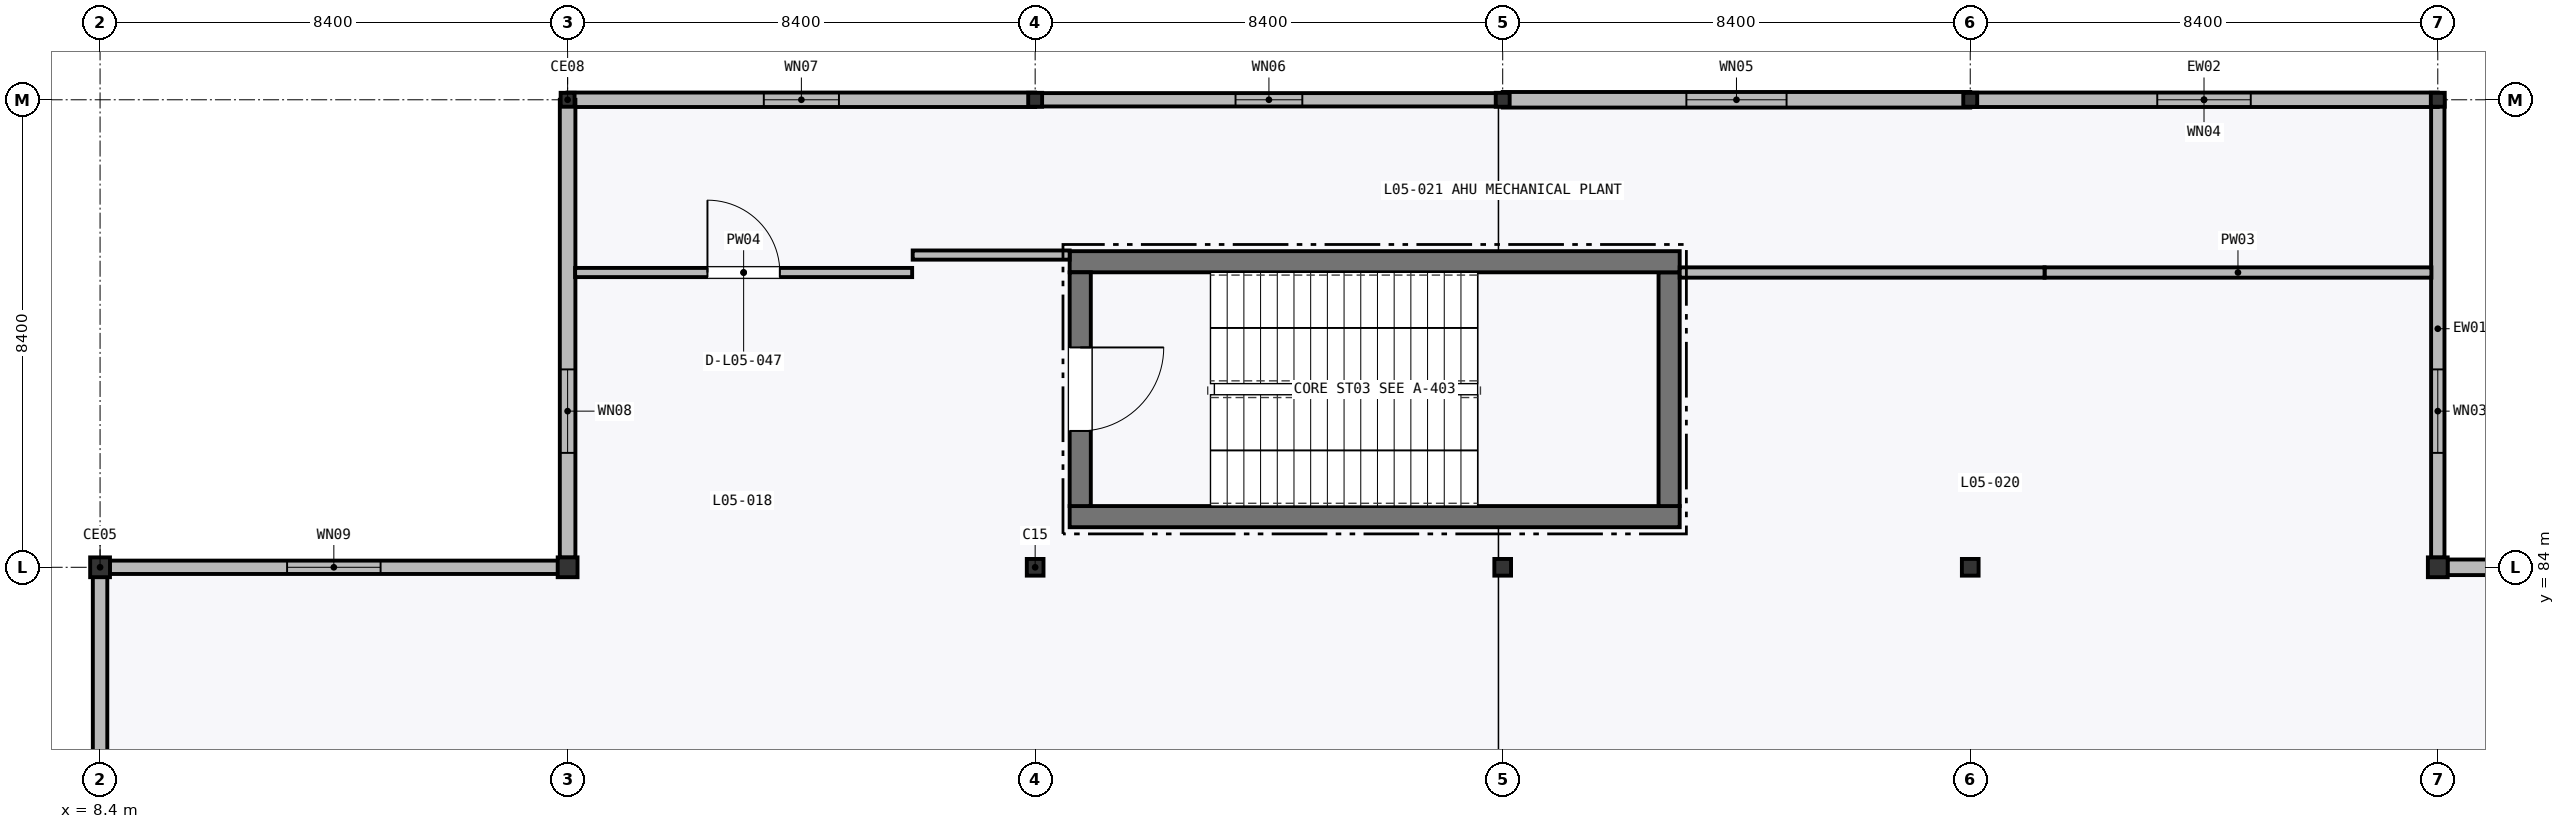
"""IFC4 building model, lengths in metres.
Left out: names, types, materials, properties, quantities, classifications, styles, units other than length and angle.
Written with IfcOpenShell. Run it as: python <this file> out.ifc"""

import sys

from ifc_helpers import new_model, si_unit, direction, frame, frame_2d, origin, origin_2d, place, context, subcontext, project, spatial, rectangle, hollow_circle, i_section, extrude, element, fill, save


model = new_model("IFC4")
c1 = context("Model", 3, precision=1e-05, world=origin(), true_north=direction((0.0, 1.0)))
c2 = subcontext(c1, "Body", "Model", "MODEL_VIEW")
j1 = project(units=[si_unit("LENGTHUNIT", "METRE"), si_unit("PLANEANGLEUNIT", "RADIAN")], contexts=[c1])
p1 = place(None, origin())
s1 = spatial("IfcSite", under=j1, at=p1, CompositionType="ELEMENT")
p2 = place(p1, origin())
s2 = spatial("IfcBuilding", under=s1, at=p2, CompositionType="ELEMENT")
p3 = place(p2, frame((0.0, 0.0, 21.6)))
s3 = spatial("IfcBuildingStorey", under=s2, at=p3, CompositionType="ELEMENT", Elevation=21.6)
for number, where, z_axis, x_axis in (
    (1, (8.4, 84.0, 0.0), (0.0, 0.0, 1.0), (1.0, 0.0, 0.0)),
    (2, (16.8, 84.0, 0.0), (0.0, 0.0, 1.0), (1.0, 0.0, 0.0)),
):
    element("IfcColumn", number, at=place(p3, frame(where, z_axis=z_axis, x_axis=x_axis)), inside=s3, PredefinedType="COLUMN", context=c2, shape_type="SweptSolid", body=[
        extrude(hollow_circle(Radius=0.178, WallThickness=0.014, at=origin_2d()), origin(), (0.0, 0.0, 1.0), 5.1),
    ])
p4 = place(p3, frame((16.8, 92.4, 0.0), z_axis=(0.0, 0.0, 1.0), x_axis=(1.0, 0.0, 0.0)))
e3 = element("IfcColumn", 3, at=p4, inside=s3, PredefinedType="COLUMN", context=c2, shape_type="SweptSolid", body=[
    extrude(i_section(OverallWidth=0.25, OverallDepth=0.25, WebThickness=0.009, FlangeThickness=0.014, FilletRadius=0.016, at=origin_2d()), origin(), (0.0, 0.0, 1.0), 5.1),
])
p5 = place(p3, frame((25.2, 84.0, 0.0), z_axis=(0.0, 0.0, 1.0), x_axis=(1.0, 0.0, 0.0)))
e4 = element("IfcColumn", 4, at=p5, inside=s3, PredefinedType="COLUMN", context=c2, shape_type="SweptSolid", body=[
    extrude(i_section(OverallWidth=0.3, OverallDepth=0.3, WebThickness=0.01, FlangeThickness=0.015, FilletRadius=0.018, at=origin_2d()), origin(), (0.0, 0.0, 1.0), 5.1),
])
p6 = place(p3, frame((25.2, 92.4, 0.0), z_axis=(0.0, 0.0, 1.0), x_axis=(1.0, 0.0, 0.0)))
e5 = element("IfcColumn", 5, at=p6, inside=s3, PredefinedType="COLUMN", context=c2, shape_type="SweptSolid", body=[
    extrude(i_section(OverallWidth=0.25, OverallDepth=0.25, WebThickness=0.009, FlangeThickness=0.014, FilletRadius=0.016, at=origin_2d()), origin(), (0.0, 0.0, 1.0), 5.1),
])
p7 = place(p3, frame((33.6, 84.0, 0.0), z_axis=(0.0, 0.0, 1.0), x_axis=(1.0, 0.0, 0.0)))
e6 = element("IfcColumn", 6, at=p7, inside=s3, PredefinedType="COLUMN", context=c2, shape_type="SweptSolid", body=[
    extrude(i_section(OverallWidth=0.3, OverallDepth=0.3, WebThickness=0.01, FlangeThickness=0.015, FilletRadius=0.018, at=origin_2d()), origin(), (0.0, 0.0, 1.0), 5.1),
])
p8 = place(p3, frame((33.6, 92.4, 0.0), z_axis=(0.0, 0.0, 1.0), x_axis=(1.0, 0.0, 0.0)))
e7 = element("IfcColumn", 7, at=p8, inside=s3, PredefinedType="COLUMN", context=c2, shape_type="SweptSolid", body=[
    extrude(i_section(OverallWidth=0.25, OverallDepth=0.25, WebThickness=0.009, FlangeThickness=0.014, FilletRadius=0.016, at=origin_2d()), origin(), (0.0, 0.0, 1.0), 5.1),
])
p9 = place(p3, frame((42.0, 84.0, 0.0), z_axis=(0.0, 0.0, 1.0), x_axis=(1.0, 0.0, 0.0)))
e8 = element("IfcColumn", 8, at=p9, inside=s3, PredefinedType="COLUMN", context=c2, shape_type="SweptSolid", body=[
    extrude(i_section(OverallWidth=0.3, OverallDepth=0.3, WebThickness=0.01, FlangeThickness=0.015, FilletRadius=0.018, at=origin_2d()), origin(), (0.0, 0.0, 1.0), 5.1),
])
p10 = place(p3, frame((42.0, 92.4, 0.0), z_axis=(0.0, 0.0, 1.0), x_axis=(1.0, 0.0, 0.0)))
e9 = element("IfcColumn", 9, at=p10, inside=s3, PredefinedType="COLUMN", context=c2, shape_type="SweptSolid", body=[
    extrude(i_section(OverallWidth=0.25, OverallDepth=0.25, WebThickness=0.009, FlangeThickness=0.014, FilletRadius=0.016, at=origin_2d()), origin(), (0.0, 0.0, 1.0), 5.1),
])
p11 = place(p3, frame((50.4, 84.0, 0.0), z_axis=(0.0, 0.0, 1.0), x_axis=(1.0, 0.0, 0.0)))
e10 = element("IfcColumn", 10, at=p11, inside=s3, PredefinedType="COLUMN", context=c2, shape_type="SweptSolid", body=[
    extrude(hollow_circle(Radius=0.178, WallThickness=0.014, at=origin_2d()), origin(), (0.0, 0.0, 1.0), 5.1),
])
p12 = place(p3, frame((50.4, 92.4, 0.0), z_axis=(0.0, 0.0, 1.0), x_axis=(1.0, 0.0, 0.0)))
e11 = element("IfcColumn", 11, at=p12, inside=s3, PredefinedType="COLUMN", context=c2, shape_type="SweptSolid", body=[
    extrude(i_section(OverallWidth=0.25, OverallDepth=0.25, WebThickness=0.009, FlangeThickness=0.014, FilletRadius=0.016, at=origin_2d()), origin(), (0.0, 0.0, 1.0), 5.1),
])
p13 = place(p3, frame((58.65, 84.0, 0.0), z_axis=(0.0, 0.0, 1.0), x_axis=(-1.0, 0.0, 0.0)))
e12 = element("IfcWall", 12, at=p13, inside=s3, PredefinedType="STANDARD", context=c2, shape_type="SweptSolid", body=[
    extrude(rectangle(XDim=8.077, YDim=0.28, at=frame_2d((4.039, 0.0))), origin(), (0.0, 0.0, 1.0), 4.487),
])
p14 = place(p13, frame((3.364, 0.0, 0.95)))
e13 = element("IfcOpeningElement", 13, at=p14, cuts=e12, PredefinedType="OPENING", context=c2, shape_type="SweptSolid", body=[
    extrude(rectangle(XDim=1.35, YDim=1.8, at=frame_2d((0.675, 0.9))), frame((0.0, 0.15, 0.0), z_axis=(0.0, -1.0, 0.0), x_axis=(1.0, 0.0, 0.0)), (0.0, 0.0, 1.0), 0.3),
])
p15 = place(p3, frame((50.4, 84.173, 0.0), z_axis=(0.0, 0.0, 1.0), x_axis=(0.0, 1.0, 0.0)))
e14 = element("IfcWall", 14, at=p15, inside=s3, PredefinedType="STANDARD", context=c2, shape_type="SweptSolid", body=[
    extrude(rectangle(XDim=8.227, YDim=0.24, at=frame_2d((4.113, 0.0))), origin(), (0.0, 0.0, 1.0), 4.397),
])
p16 = place(p15, frame((1.883, 0.0, 0.95)))
e15 = element("IfcOpeningElement", 15, at=p16, cuts=e14, PredefinedType="OPENING", context=c2, shape_type="SweptSolid", body=[
    extrude(rectangle(XDim=1.5, YDim=1.8, at=frame_2d((0.75, 0.9))), frame((0.0, 0.13, 0.0), z_axis=(0.0, -1.0, 0.0), x_axis=(1.0, 0.0, 0.0)), (0.0, 0.0, 1.0), 0.26),
])
p17 = place(p3, frame((50.4, 92.4, 0.0), z_axis=(0.0, 0.0, 1.0), x_axis=(-1.0, 0.0, 0.0)))
e16 = element("IfcWall", 16, at=p17, inside=s3, PredefinedType="STANDARD", context=c2, shape_type="SweptSolid", body=[
    extrude(rectangle(XDim=8.4, YDim=0.26, at=frame_2d((4.2, 0.0))), origin(), (0.0, 0.0, 1.0), 4.397),
])
p18 = place(p17, frame((3.36, 0.0, 0.95)))
e17 = element("IfcOpeningElement", 17, at=p18, cuts=e16, PredefinedType="OPENING", context=c2, shape_type="SweptSolid", body=[
    extrude(rectangle(XDim=1.68, YDim=1.8, at=frame_2d((0.84, 0.9))), frame((0.0, 0.14, 0.0), z_axis=(0.0, -1.0, 0.0), x_axis=(1.0, 0.0, 0.0)), (0.0, 0.0, 1.0), 0.28),
])
p19 = place(p3, frame((42.0, 92.4, 0.0), z_axis=(0.0, 0.0, 1.0), x_axis=(-1.0, 0.0, 0.0)))
e18 = element("IfcWall", 18, at=p19, inside=s3, PredefinedType="STANDARD", context=c2, shape_type="SweptSolid", body=[
    extrude(rectangle(XDim=8.4, YDim=0.28, at=frame_2d((4.2, 0.0))), origin(), (0.0, 0.0, 1.0), 4.397),
])
p20 = place(p19, frame((3.3, 0.0, 0.95)))
e19 = element("IfcOpeningElement", 19, at=p20, cuts=e18, PredefinedType="OPENING", context=c2, shape_type="SweptSolid", body=[
    extrude(rectangle(XDim=1.8, YDim=1.8, at=frame_2d((0.9, 0.9))), frame((0.0, 0.15, 0.0), z_axis=(0.0, -1.0, 0.0), x_axis=(1.0, 0.0, 0.0)), (0.0, 0.0, 1.0), 0.3),
])
p21 = place(p3, frame((33.6, 92.4, 0.0), z_axis=(0.0, 0.0, 1.0), x_axis=(-1.0, 0.0, 0.0)))
e20 = element("IfcWall", 20, at=p21, inside=s3, PredefinedType="STANDARD", context=c2, shape_type="SweptSolid", body=[
    extrude(rectangle(XDim=8.4, YDim=0.24, at=frame_2d((4.2, 0.0))), origin(), (0.0, 0.0, 1.0), 4.397),
])
p22 = place(p21, frame((3.6, 0.0, 0.95)))
e21 = element("IfcOpeningElement", 21, at=p22, cuts=e20, PredefinedType="OPENING", context=c2, shape_type="SweptSolid", body=[
    extrude(rectangle(XDim=1.2, YDim=2.1, at=frame_2d((0.6, 1.05))), frame((0.0, 0.13, 0.0), z_axis=(0.0, -1.0, 0.0), x_axis=(1.0, 0.0, 0.0)), (0.0, 0.0, 1.0), 0.26),
])
p23 = place(p3, frame((25.2, 92.4, 0.0), z_axis=(0.0, 0.0, 1.0), x_axis=(-1.0, 0.0, 0.0)))
e22 = element("IfcWall", 22, at=p23, inside=s3, PredefinedType="STANDARD", context=c2, shape_type="SweptSolid", body=[
    extrude(rectangle(XDim=8.4, YDim=0.26, at=frame_2d((4.2, 0.0))), origin(), (0.0, 0.0, 1.0), 4.397),
])
p24 = place(p23, frame((3.525, 0.0, 0.95)))
e23 = element("IfcOpeningElement", 23, at=p24, cuts=e22, PredefinedType="OPENING", context=c2, shape_type="SweptSolid", body=[
    extrude(rectangle(XDim=1.35, YDim=2.1, at=frame_2d((0.675, 1.05))), frame((0.0, 0.14, 0.0), z_axis=(0.0, -1.0, 0.0), x_axis=(1.0, 0.0, 0.0)), (0.0, 0.0, 1.0), 0.28),
])
p25 = place(p3, frame((16.8, 92.4, 0.0), z_axis=(0.0, 0.0, 1.0), x_axis=(0.0, -1.0, 0.0)))
e24 = element("IfcWall", 24, at=p25, inside=s3, PredefinedType="STANDARD", context=c2, shape_type="SweptSolid", body=[
    extrude(rectangle(XDim=8.227, YDim=0.28, at=frame_2d((4.113, 0.0))), origin(), (0.0, 0.0, 1.0), 4.397),
])
p26 = place(p25, frame((4.844, 0.0, 0.95)))
e25 = element("IfcOpeningElement", 25, at=p26, cuts=e24, PredefinedType="OPENING", context=c2, shape_type="SweptSolid", body=[
    extrude(rectangle(XDim=1.5, YDim=2.1, at=frame_2d((0.75, 1.05))), frame((0.0, 0.15, 0.0), z_axis=(0.0, -1.0, 0.0), x_axis=(1.0, 0.0, 0.0)), (0.0, 0.0, 1.0), 0.3),
])
p27 = place(p3, frame((16.627, 84.0, 0.0), z_axis=(0.0, 0.0, 1.0), x_axis=(-1.0, 0.0, 0.0)))
e26 = element("IfcWall", 26, at=p27, inside=s3, PredefinedType="STANDARD", context=c2, shape_type="SweptSolid", body=[
    extrude(rectangle(XDim=8.054, YDim=0.24, at=frame_2d((4.027, 0.0))), origin(), (0.0, 0.0, 1.0), 4.487),
])
p28 = place(p27, frame((3.187, 0.0, 0.95)))
e27 = element("IfcOpeningElement", 27, at=p28, cuts=e26, PredefinedType="OPENING", context=c2, shape_type="SweptSolid", body=[
    extrude(rectangle(XDim=1.68, YDim=2.1, at=frame_2d((0.84, 1.05))), frame((0.0, 0.13, 0.0), z_axis=(0.0, -1.0, 0.0), x_axis=(1.0, 0.0, 0.0)), (0.0, 0.0, 1.0), 0.26),
])
p29 = place(p3, frame((8.4, 83.827, 0.0), z_axis=(0.0, 0.0, 1.0), x_axis=(0.0, -1.0, 0.0)))
e28 = element("IfcWall", 28, at=p29, inside=s3, PredefinedType="STANDARD", context=c2, shape_type="SweptSolid", body=[
    extrude(rectangle(XDim=8.227, YDim=0.26, at=frame_2d((4.113, 0.0))), origin(), (0.0, 0.0, 1.0), 4.397),
])
p30 = place(p29, frame((3.213, 0.0, 0.95)))
e29 = element("IfcOpeningElement", 29, at=p30, cuts=e28, PredefinedType="OPENING", context=c2, shape_type="SweptSolid", body=[
    extrude(rectangle(XDim=1.8, YDim=2.1, at=frame_2d((0.9, 1.05))), frame((0.0, 0.14, 0.0), z_axis=(0.0, -1.0, 0.0), x_axis=(1.0, 0.0, 0.0)), (0.0, 0.0, 1.0), 0.28),
])
p31 = place(p3, frame((25.82, 84.91, 0.0), z_axis=(0.0, 0.0, 1.0), x_axis=(1.0, 0.0, 0.0)))
e30 = element("IfcWall", 30, at=p31, inside=s3, PredefinedType="SHEAR", context=c2, shape_type="SweptSolid", body=[
    extrude(rectangle(XDim=10.96, YDim=0.38, at=frame_2d((5.48, 0.0))), origin(), (0.0, 0.0, 1.0), 4.845),
])
p32 = place(p3, frame((36.59, 85.1, 0.0), z_axis=(0.0, 0.0, 1.0), x_axis=(0.0, 1.0, 0.0)))
e31 = element("IfcWall", 31, at=p32, inside=s3, PredefinedType="SHEAR", context=c2, shape_type="SweptSolid", body=[
    extrude(rectangle(XDim=4.2, YDim=0.38, at=frame_2d((2.1, 0.0))), origin(), (0.0, 0.0, 1.0), 4.845),
])
p33 = place(p3, frame((36.78, 89.49, 0.0), z_axis=(0.0, 0.0, 1.0), x_axis=(-1.0, 0.0, 0.0)))
e32 = element("IfcWall", 32, at=p33, inside=s3, PredefinedType="SHEAR", context=c2, shape_type="SweptSolid", body=[
    extrude(rectangle(XDim=10.96, YDim=0.38, at=frame_2d((5.48, 0.0))), origin(), (0.0, 0.0, 1.0), 4.845),
])
p34 = place(p3, frame((26.01, 89.3, 0.0), z_axis=(0.0, 0.0, 1.0), x_axis=(0.0, -1.0, 0.0)))
e33 = element("IfcWall", 33, at=p34, inside=s3, PredefinedType="SHEAR", context=c2, shape_type="SweptSolid", body=[
    extrude(rectangle(XDim=4.2, YDim=0.38, at=frame_2d((2.1, 0.0))), origin(), (0.0, 0.0, 1.0), 4.845),
])
p35 = place(p34, frame((1.35, 0.0, 0.0)))
e34 = element("IfcOpeningElement", 34, at=p35, cuts=e33, PredefinedType="OPENING", context=c2, shape_type="SweptSolid", body=[
    extrude(rectangle(XDim=1.5, YDim=2.15, at=frame_2d((0.75, 1.075))), frame((0.0, 0.2, 0.0), z_axis=(0.0, -1.0, 0.0), x_axis=(1.0, 0.0, 0.0)), (0.0, 0.0, 1.0), 0.4),
])
p36 = place(p3, frame((50.285, 89.296, 0.0), z_axis=(0.0, 0.0, 1.0), x_axis=(-1.0, 0.0, 0.0)))
e35 = element("IfcWall", 35, at=p36, inside=s3, PredefinedType="PARTITIONING", context=c2, shape_type="SweptSolid", body=[
    extrude(rectangle(XDim=6.95, YDim=0.185, at=frame_2d((3.475, 0.0))), origin(), (0.0, 0.0, 1.0), 4.845),
])
p37 = place(p3, frame((43.335, 89.296, 0.0), z_axis=(0.0, 0.0, 1.0), x_axis=(-1.0, 0.0, 0.0)))
e36 = element("IfcWall", 36, at=p37, inside=s3, PredefinedType="PARTITIONING", context=c2, shape_type="SweptSolid", body=[
    extrude(rectangle(XDim=6.555, YDim=0.185, at=frame_2d((3.277, 0.0))), origin(), (0.0, 0.0, 1.0), 4.845),
])
p38 = place(p3, frame((16.935, 89.296, 0.0), z_axis=(0.0, 0.0, 1.0), x_axis=(1.0, 0.0, 0.0)))
e37 = element("IfcWall", 37, at=p38, inside=s3, PredefinedType="PARTITIONING", context=c2, shape_type="SweptSolid", body=[
    extrude(rectangle(XDim=6.055, YDim=0.165, at=frame_2d((3.027, 0.0))), origin(), (0.0, 0.0, 1.0), 4.845),
])
p39 = place(p38, frame((2.377, 0.0, 0.0)))
e38 = element("IfcOpeningElement", 38, at=p39, cuts=e37, PredefinedType="OPENING", context=c2, shape_type="SweptSolid", body=[
    extrude(rectangle(XDim=1.3, YDim=2.2, at=frame_2d((0.65, 1.1))), frame((0.0, 0.093, 0.0), z_axis=(0.0, -1.0, 0.0), x_axis=(1.0, 0.0, 0.0)), (0.0, 0.0, 1.0), 0.185),
])
p40 = place(p3, frame((23.0, 89.61, 0.0), z_axis=(0.0, 0.0, 1.0), x_axis=(1.0, 0.0, 0.0)))
e39 = element("IfcWall", 39, at=p40, inside=s3, PredefinedType="PARTITIONING", context=c2, shape_type="SweptSolid", body=[
    extrude(rectangle(XDim=2.82, YDim=0.165, at=frame_2d((1.41, 0.0))), origin(), (0.0, 0.0, 1.0), 4.845),
])
p41 = place(p16, origin())
e40 = element("IfcWindow", 40, at=p41, inside=s3, PartitioningType="SINGLE_PANEL", PredefinedType="WINDOW", context=c2, shape_type="SweptSolid", body=[
    extrude(rectangle(XDim=1.5, YDim=1.8, at=frame_2d((0.75, 0.9))), frame((0.0, 0.03, 0.0), z_axis=(0.0, -1.0, 0.0), x_axis=(1.0, 0.0, 0.0)), (0.0, 0.0, 1.0), 0.06),
])
fill(e15, e40)
p42 = place(p18, origin())
e41 = element("IfcWindow", 41, at=p42, inside=s3, PartitioningType="SINGLE_PANEL", PredefinedType="WINDOW", context=c2, shape_type="SweptSolid", body=[
    extrude(rectangle(XDim=1.68, YDim=1.8, at=frame_2d((0.84, 0.9))), frame((0.0, 0.03, 0.0), z_axis=(0.0, -1.0, 0.0), x_axis=(1.0, 0.0, 0.0)), (0.0, 0.0, 1.0), 0.06),
])
fill(e17, e41)
p43 = place(p20, origin())
e42 = element("IfcWindow", 42, at=p43, inside=s3, PartitioningType="SINGLE_PANEL", PredefinedType="WINDOW", context=c2, shape_type="SweptSolid", body=[
    extrude(rectangle(XDim=1.8, YDim=1.8, at=frame_2d((0.9, 0.9))), frame((0.0, 0.03, 0.0), z_axis=(0.0, -1.0, 0.0), x_axis=(1.0, 0.0, 0.0)), (0.0, 0.0, 1.0), 0.06),
])
fill(e19, e42)
p44 = place(p22, origin())
e43 = element("IfcWindow", 43, at=p44, inside=s3, PartitioningType="SINGLE_PANEL", PredefinedType="WINDOW", context=c2, shape_type="SweptSolid", body=[
    extrude(rectangle(XDim=1.2, YDim=2.1, at=frame_2d((0.6, 1.05))), frame((0.0, 0.03, 0.0), z_axis=(0.0, -1.0, 0.0), x_axis=(1.0, 0.0, 0.0)), (0.0, 0.0, 1.0), 0.06),
])
fill(e21, e43)
p45 = place(p24, origin())
e44 = element("IfcWindow", 44, at=p45, inside=s3, PartitioningType="SINGLE_PANEL", PredefinedType="WINDOW", context=c2, shape_type="SweptSolid", body=[
    extrude(rectangle(XDim=1.35, YDim=2.1, at=frame_2d((0.675, 1.05))), frame((0.0, 0.03, 0.0), z_axis=(0.0, -1.0, 0.0), x_axis=(1.0, 0.0, 0.0)), (0.0, 0.0, 1.0), 0.06),
])
fill(e23, e44)
p46 = place(p26, origin())
e45 = element("IfcWindow", 45, at=p46, inside=s3, PartitioningType="SINGLE_PANEL", PredefinedType="WINDOW", context=c2, shape_type="SweptSolid", body=[
    extrude(rectangle(XDim=1.5, YDim=2.1, at=frame_2d((0.75, 1.05))), frame((0.0, 0.03, 0.0), z_axis=(0.0, -1.0, 0.0), x_axis=(1.0, 0.0, 0.0)), (0.0, 0.0, 1.0), 0.06),
])
fill(e25, e45)
p47 = place(p28, origin())
e46 = element("IfcWindow", 46, at=p47, inside=s3, PartitioningType="SINGLE_PANEL", PredefinedType="WINDOW", context=c2, shape_type="SweptSolid", body=[
    extrude(rectangle(XDim=1.68, YDim=2.1, at=frame_2d((0.84, 1.05))), frame((0.0, 0.03, 0.0), z_axis=(0.0, -1.0, 0.0), x_axis=(1.0, 0.0, 0.0)), (0.0, 0.0, 1.0), 0.06),
])
fill(e27, e46)
p48 = place(p35, origin())
e47 = element("IfcDoor", 47, at=p48, inside=s3, OperationType="SINGLE_SWING_LEFT", PredefinedType="DOOR", context=c2, shape_type="SweptSolid", body=[
    extrude(rectangle(XDim=1.5, YDim=2.15, at=frame_2d((0.75, 1.075))), frame((0.0, 0.025, 0.0), z_axis=(0.0, -1.0, 0.0), x_axis=(1.0, 0.0, 0.0)), (0.0, 0.0, 1.0), 0.05),
])
fill(e34, e47)
p49 = place(p39, origin())
e48 = element("IfcDoor", 48, at=p49, inside=s3, OperationType="SINGLE_SWING_LEFT", PredefinedType="DOOR", context=c2, shape_type="SweptSolid", body=[
    extrude(rectangle(XDim=1.3, YDim=2.2, at=frame_2d((0.65, 1.1))), frame((0.0, 0.025, 0.0), z_axis=(0.0, -1.0, 0.0), x_axis=(1.0, 0.0, 0.0)), (0.0, 0.0, 1.0), 0.05),
])
fill(e38, e48)
save(model, sys.argv[1])
